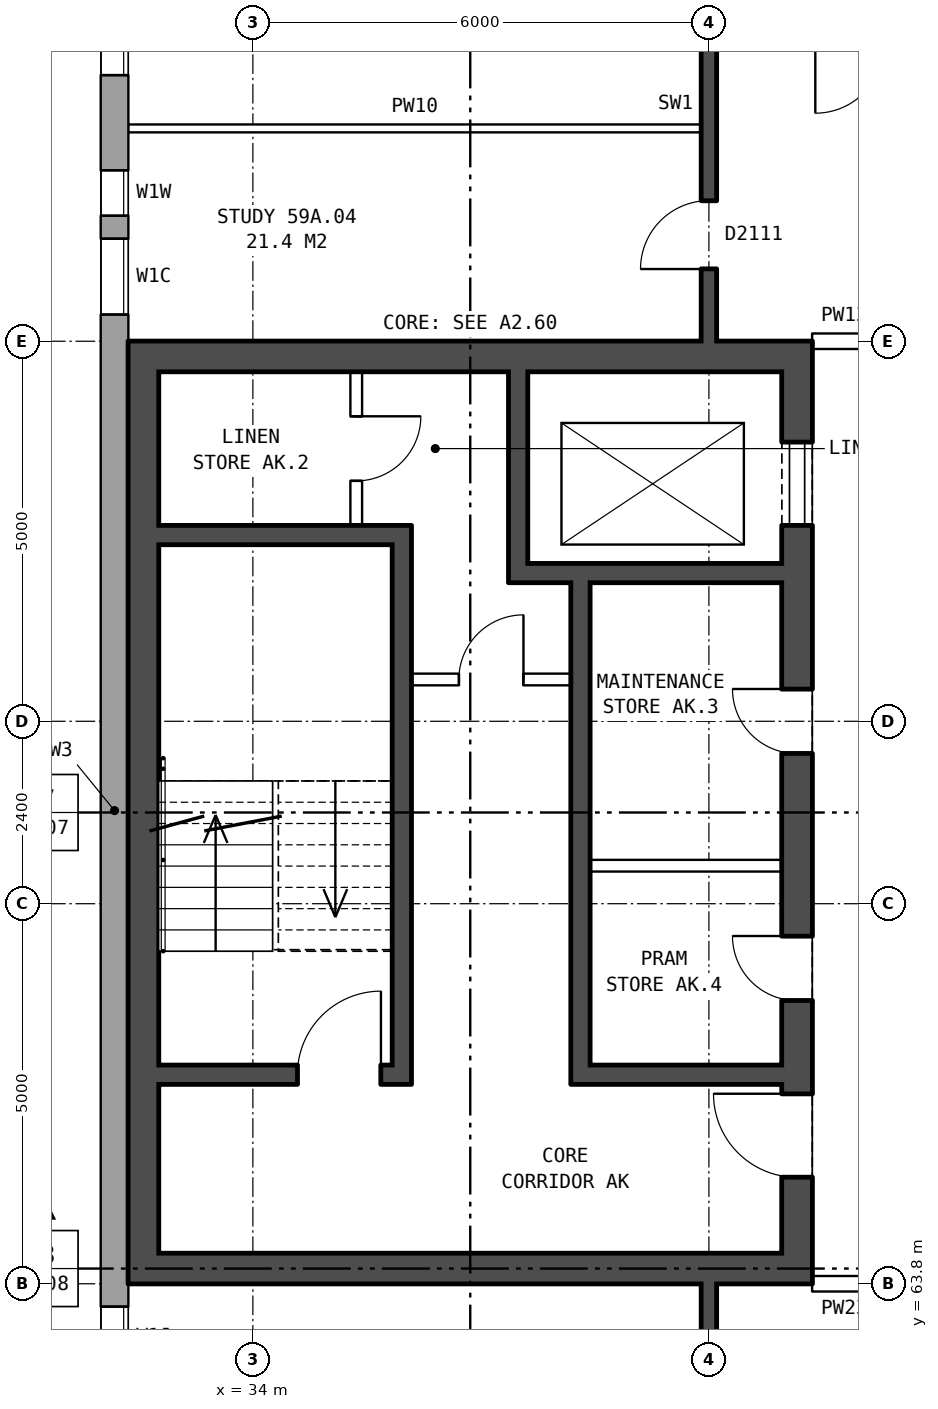
"""IFC4 building model, lengths in metres.
Left out: names, types, materials, properties, quantities, classifications, styles, units other than length and angle.
Written with IfcOpenShell. Run it as: python <this file> out.ifc"""

import sys

from ifc_helpers import new_model, si_unit, direction, frame, frame_2d, origin, place, context, subcontext, project, spatial, rectangle, extrude, element, fill, save


model = new_model("IFC4")
c1 = context("Model", 3, precision=1e-05, world=origin(), true_north=direction((0.0, 1.0)))
c2 = subcontext(c1, "Body", "Model", "MODEL_VIEW")
j1 = project(units=[si_unit("LENGTHUNIT", "METRE"), si_unit("PLANEANGLEUNIT", "RADIAN")], contexts=[c1])
p1 = place(None, origin())
s1 = spatial("IfcSite", under=j1, at=p1, CompositionType="ELEMENT")
p2 = place(p1, origin())
s2 = spatial("IfcBuilding", under=s1, at=p2, CompositionType="ELEMENT")
p3 = place(p2, frame((0.0, 0.0, 209.0)))
s3 = spatial("IfcBuildingStorey", under=s2, at=p3, CompositionType="ELEMENT", Elevation=209.0)
p4 = place(p3, frame((32.18, 82.925, 0.0), z_axis=(0.0, 0.0, 1.0), x_axis=(0.0, -1.0, 0.0)))
e1 = element("IfcWall", 1, at=p4, inside=s3, PredefinedType="STANDARD", context=c2, shape_type="SweptSolid", body=[
    extrude(rectangle(XDim=25.851, YDim=0.36, at=frame_2d((12.925, 0.0))), origin(), (0.0, 0.0, 1.0), 2.85),
])
p5 = place(p4, frame((1.625, 0.0, 0.8)))
e2 = element("IfcOpeningElement", 2, at=p5, cuts=e1, PredefinedType="OPENING", context=c2, shape_type="SweptSolid", body=[
    extrude(rectangle(XDim=1.6, YDim=1.8, at=frame_2d((0.8, 0.9))), frame((0.0, 0.19, 0.0), z_axis=(0.0, -1.0, 0.0), x_axis=(1.0, 0.0, 0.0)), (0.0, 0.0, 1.0), 0.38),
])
p6 = place(p4, frame((4.475, 0.0, 0.15)))
e3 = element("IfcOpeningElement", 3, at=p6, cuts=e1, PredefinedType="OPENING", context=c2, shape_type="SweptSolid", body=[
    extrude(rectangle(XDim=0.6, YDim=0.9, at=frame_2d((0.3, 0.45))), frame((0.0, 0.19, 0.0), z_axis=(0.0, -1.0, 0.0), x_axis=(1.0, 0.0, 0.0)), (0.0, 0.0, 1.0), 0.38),
])
p7 = place(p4, frame((19.425, 0.0, 0.8)))
e4 = element("IfcOpeningElement", 4, at=p7, cuts=e1, PredefinedType="OPENING", context=c2, shape_type="SweptSolid", body=[
    extrude(rectangle(XDim=0.8, YDim=1.5, at=frame_2d((0.4, 0.75))), frame((0.0, 0.19, 0.0), z_axis=(0.0, -1.0, 0.0), x_axis=(1.0, 0.0, 0.0)), (0.0, 0.0, 1.0), 0.38),
])
p8 = place(p4, frame((22.625, 0.0, 0.8)))
e5 = element("IfcOpeningElement", 5, at=p8, cuts=e1, PredefinedType="OPENING", context=c2, shape_type="SweptSolid", body=[
    extrude(rectangle(XDim=1.6, YDim=1.8, at=frame_2d((0.8, 0.9))), frame((0.0, 0.19, 0.0), z_axis=(0.0, -1.0, 0.0), x_axis=(1.0, 0.0, 0.0)), (0.0, 0.0, 1.0), 0.38),
])
p9 = place(p4, frame((5.375, 0.0, 0.15)))
e6 = element("IfcOpeningElement", 6, at=p9, cuts=e1, PredefinedType="OPENING", context=c2, shape_type="SweptSolid", body=[
    extrude(rectangle(XDim=1.0, YDim=1.8, at=frame_2d((0.5, 0.9))), frame((0.0, 0.19, 0.0), z_axis=(0.0, -1.0, 0.0), x_axis=(1.0, 0.0, 0.0)), (0.0, 0.0, 1.0), 0.38),
])
p10 = place(p4, frame((21.475, 0.0, 1.7)))
e7 = element("IfcOpeningElement", 7, at=p10, cuts=e1, PredefinedType="OPENING", context=c2, shape_type="SweptSolid", body=[
    extrude(rectangle(XDim=0.8, YDim=0.9, at=frame_2d((0.4, 0.45))), frame((0.0, 0.19, 0.0), z_axis=(0.0, -1.0, 0.0), x_axis=(1.0, 0.0, 0.0)), (0.0, 0.0, 1.0), 0.38),
])
p11 = place(p3, frame((41.16, 76.2, 0.0), z_axis=(0.0, 0.0, 1.0), x_axis=(0.0, -1.0, 0.0)))
e8 = element("IfcWall", 8, at=p11, inside=s3, PredefinedType="SHEAR", context=c2, shape_type="SweptSolid", body=[
    extrude(rectangle(XDim=12.4, YDim=0.4, at=frame_2d((6.2, 0.0))), origin(), (0.0, 0.0, 1.0), 2.85),
])
p12 = place(p11, frame((1.325, 0.0, 0.0)))
e9 = element("IfcOpeningElement", 9, at=p12, cuts=e8, PredefinedType="OPENING", context=c2, shape_type="SweptSolid", body=[
    extrude(rectangle(XDim=1.1, YDim=2.1, at=frame_2d((0.55, 1.05))), frame((0.0, 0.21, 0.0), z_axis=(0.0, -1.0, 0.0), x_axis=(1.0, 0.0, 0.0)), (0.0, 0.0, 1.0), 0.42),
])
p13 = place(p11, frame((4.575, 0.0, 0.0)))
e10 = element("IfcOpeningElement", 10, at=p13, cuts=e8, PredefinedType="OPENING", context=c2, shape_type="SweptSolid", body=[
    extrude(rectangle(XDim=0.85, YDim=2.1, at=frame_2d((0.425, 1.05))), frame((0.0, 0.21, 0.0), z_axis=(0.0, -1.0, 0.0), x_axis=(1.0, 0.0, 0.0)), (0.0, 0.0, 1.0), 0.42),
])
p14 = place(p11, frame((7.825, 0.0, 0.0)))
e11 = element("IfcOpeningElement", 11, at=p14, cuts=e8, PredefinedType="OPENING", context=c2, shape_type="SweptSolid", body=[
    extrude(rectangle(XDim=0.85, YDim=2.1, at=frame_2d((0.425, 1.05))), frame((0.0, 0.21, 0.0), z_axis=(0.0, -1.0, 0.0), x_axis=(1.0, 0.0, 0.0)), (0.0, 0.0, 1.0), 0.42),
])
p15 = place(p11, frame((9.9, 0.0, 0.0)))
e12 = element("IfcOpeningElement", 12, at=p15, cuts=e8, PredefinedType="OPENING", context=c2, shape_type="SweptSolid", body=[
    extrude(rectangle(XDim=1.1, YDim=2.1, at=frame_2d((0.55, 1.05))), frame((0.0, 0.21, 0.0), z_axis=(0.0, -1.0, 0.0), x_axis=(1.0, 0.0, 0.0)), (0.0, 0.0, 1.0), 0.42),
])
p16 = place(p3, frame((32.56, 76.2, 0.0), z_axis=(0.0, 0.0, 1.0), x_axis=(0.0, -1.0, 0.0)))
e13 = element("IfcWall", 13, at=p16, inside=s3, PredefinedType="SHEAR", context=c2, shape_type="SweptSolid", body=[
    extrude(rectangle(XDim=12.4, YDim=0.4, at=frame_2d((6.2, 0.0))), origin(), (0.0, 0.0, 1.0), 2.85),
])
for number, where, z_axis, x_axis in (
    (14, (40.96, 76.0, 0.0), (0.0, 0.0, 1.0), (-1.0, 0.0, 0.0)),
    (15, (40.96, 64.0, 0.0), (0.0, 0.0, 1.0), (-1.0, 0.0, 0.0)),
):
    element("IfcWall", number, at=place(p3, frame(where, z_axis=z_axis, x_axis=x_axis)), inside=s3, PredefinedType="SHEAR", context=c2, shape_type="SweptSolid", body=[
        extrude(rectangle(XDim=8.2, YDim=0.4, at=frame_2d((4.1, 0.0))), origin(), (0.0, 0.0, 1.0), 2.85),
    ])
p17 = place(p3, frame((35.835, 73.65, 0.0), z_axis=(0.0, 0.0, 1.0), x_axis=(-1.0, 0.0, 0.0)))
e16 = element("IfcWall", 16, at=p17, inside=s3, PredefinedType="SHEAR", context=c2, shape_type="SweptSolid", body=[
    extrude(rectangle(XDim=3.075, YDim=0.25, at=frame_2d((1.538, 0.0))), origin(), (0.0, 0.0, 1.0), 2.85),
])
p18 = place(p3, frame((40.96, 73.15, 0.0), z_axis=(0.0, 0.0, 1.0), x_axis=(-1.0, 0.0, 0.0)))
e17 = element("IfcWall", 17, at=p18, inside=s3, PredefinedType="SHEAR", context=c2, shape_type="SweptSolid", body=[
    extrude(rectangle(XDim=3.595, YDim=0.25, at=frame_2d((1.797, 0.0))), origin(), (0.0, 0.0, 1.0), 2.85),
])
p19 = place(p3, frame((38.185, 71.75, 0.0), z_axis=(0.0, 0.0, 1.0), x_axis=(-1.0, 0.0, 0.0)))
e18 = element("IfcWall", 18, at=p19, inside=s3, PredefinedType="PARTITIONING", context=c2, shape_type="SweptSolid", body=[
    extrude(rectangle(XDim=2.1, YDim=0.15, at=frame_2d((1.05, 0.0))), origin(), (0.0, 0.0, 1.0), 2.85),
])
p20 = place(p19, frame((0.625, 0.0, 0.0)))
e19 = element("IfcOpeningElement", 19, at=p20, cuts=e18, PredefinedType="OPENING", context=c2, shape_type="SweptSolid", body=[
    extrude(rectangle(XDim=0.85, YDim=2.1, at=frame_2d((0.425, 1.05))), frame((0.0, 0.085, 0.0), z_axis=(0.0, -1.0, 0.0), x_axis=(1.0, 0.0, 0.0)), (0.0, 0.0, 1.0), 0.17),
])
p21 = place(p3, frame((40.96, 69.3, 0.0), z_axis=(0.0, 0.0, 1.0), x_axis=(-1.0, 0.0, 0.0)))
e20 = element("IfcWall", 20, at=p21, inside=s3, PredefinedType="PARTITIONING", context=c2, shape_type="SweptSolid", body=[
    extrude(rectangle(XDim=2.525, YDim=0.15, at=frame_2d((1.262, 0.0))), origin(), (0.0, 0.0, 1.0), 2.85),
])
p22 = place(p3, frame((40.96, 66.55, 0.0), z_axis=(0.0, 0.0, 1.0), x_axis=(-1.0, 0.0, 0.0)))
e21 = element("IfcWall", 21, at=p22, inside=s3, PredefinedType="SHEAR", context=c2, shape_type="SweptSolid", body=[
    extrude(rectangle(XDim=2.525, YDim=0.25, at=frame_2d((1.262, 0.0))), origin(), (0.0, 0.0, 1.0), 2.85),
])
p23 = place(p3, frame((35.835, 66.55, 0.0), z_axis=(0.0, 0.0, 1.0), x_axis=(-1.0, 0.0, 0.0)))
e22 = element("IfcWall", 22, at=p23, inside=s3, PredefinedType="SHEAR", context=c2, shape_type="SweptSolid", body=[
    extrude(rectangle(XDim=3.075, YDim=0.25, at=frame_2d((1.538, 0.0))), origin(), (0.0, 0.0, 1.0), 2.85),
])
p24 = place(p23, frame((0.15, 0.0, 0.0)))
e23 = element("IfcOpeningElement", 23, at=p24, cuts=e22, PredefinedType="OPENING", context=c2, shape_type="SweptSolid", body=[
    extrude(rectangle(XDim=1.1, YDim=2.1, at=frame_2d((0.55, 1.05))), frame((0.0, 0.135, 0.0), z_axis=(0.0, -1.0, 0.0), x_axis=(1.0, 0.0, 0.0)), (0.0, 0.0, 1.0), 0.27),
])
p25 = place(p3, frame((38.31, 73.025, 0.0), z_axis=(0.0, 0.0, 1.0), x_axis=(0.0, -1.0, 0.0)))
e24 = element("IfcWall", 24, at=p25, inside=s3, PredefinedType="SHEAR", context=c2, shape_type="SweptSolid", body=[
    extrude(rectangle(XDim=6.6, YDim=0.25, at=frame_2d((3.3, 0.0))), origin(), (0.0, 0.0, 1.0), 2.85),
])
p26 = place(p3, frame((37.49, 75.8, 0.0), z_axis=(0.0, 0.0, 1.0), x_axis=(0.0, -1.0, 0.0)))
e25 = element("IfcWall", 25, at=p26, inside=s3, PredefinedType="SHEAR", context=c2, shape_type="SweptSolid", body=[
    extrude(rectangle(XDim=2.525, YDim=0.25, at=frame_2d((1.263, 0.0))), origin(), (0.0, 0.0, 1.0), 2.85),
])
p27 = place(p3, frame((35.96, 73.775, 0.0), z_axis=(0.0, 0.0, 1.0), x_axis=(0.0, -1.0, 0.0)))
e26 = element("IfcWall", 26, at=p27, inside=s3, PredefinedType="SHEAR", context=c2, shape_type="SweptSolid", body=[
    extrude(rectangle(XDim=7.35, YDim=0.25, at=frame_2d((3.675, 0.0))), origin(), (0.0, 0.0, 1.0), 2.85),
])
p28 = place(p3, frame((35.36, 75.8, 0.0), z_axis=(0.0, 0.0, 1.0), x_axis=(0.0, -1.0, 0.0)))
e27 = element("IfcWall", 27, at=p28, inside=s3, PredefinedType="PARTITIONING", context=c2, shape_type="SweptSolid", body=[
    extrude(rectangle(XDim=2.025, YDim=0.15, at=frame_2d((1.013, 0.0))), origin(), (0.0, 0.0, 1.0), 2.85),
])
p29 = place(p28, frame((0.587, 0.0, 0.0)))
e28 = element("IfcOpeningElement", 28, at=p29, cuts=e27, PredefinedType="OPENING", context=c2, shape_type="SweptSolid", body=[
    extrude(rectangle(XDim=0.85, YDim=2.1, at=frame_2d((0.425, 1.05))), frame((0.0, 0.085, 0.0), z_axis=(0.0, -1.0, 0.0), x_axis=(1.0, 0.0, 0.0)), (0.0, 0.0, 1.0), 0.17),
])
p30 = place(p3, frame((41.36, 63.8, 0.0), z_axis=(0.0, 0.0, 1.0), x_axis=(1.0, 0.0, 0.0)))
e29 = element("IfcWall", 29, at=p30, inside=s3, PredefinedType="PARTITIONING", context=c2, shape_type="SweptSolid", body=[
    extrude(rectangle(XDim=3.0, YDim=0.2, at=frame_2d((1.5, 0.0))), origin(), (0.0, 0.0, 1.0), 2.85),
])
p31 = place(p30, frame((1.0, 0.0, 0.0)))
e30 = element("IfcOpeningElement", 30, at=p31, cuts=e29, PredefinedType="OPENING", context=c2, shape_type="SweptSolid", body=[
    extrude(rectangle(XDim=1.0, YDim=2.1, at=frame_2d((0.5, 1.05))), frame((0.0, 0.11, 0.0), z_axis=(0.0, -1.0, 0.0), x_axis=(1.0, 0.0, 0.0)), (0.0, 0.0, 1.0), 0.22),
])
p32 = place(p3, frame((41.36, 76.2, 0.0), z_axis=(0.0, 0.0, 1.0), x_axis=(1.0, 0.0, 0.0)))
e31 = element("IfcWall", 31, at=p32, inside=s3, PredefinedType="PARTITIONING", context=c2, shape_type="SweptSolid", body=[
    extrude(rectangle(XDim=3.0, YDim=0.2, at=frame_2d((1.5, 0.0))), origin(), (0.0, 0.0, 1.0), 2.85),
])
p33 = place(p32, frame((1.0, 0.0, 0.0)))
e32 = element("IfcOpeningElement", 32, at=p33, cuts=e31, PredefinedType="OPENING", context=c2, shape_type="SweptSolid", body=[
    extrude(rectangle(XDim=1.0, YDim=2.1, at=frame_2d((0.5, 1.05))), frame((0.0, 0.11, 0.0), z_axis=(0.0, -1.0, 0.0), x_axis=(1.0, 0.0, 0.0)), (0.0, 0.0, 1.0), 0.22),
])
p34 = place(p3, frame((32.36, 79.0, 0.0), z_axis=(0.0, 0.0, 1.0), x_axis=(1.0, 0.0, 0.0)))
e33 = element("IfcWall", 33, at=p34, inside=s3, PredefinedType="PARTITIONING", context=c2, shape_type="SweptSolid", body=[
    extrude(rectangle(XDim=7.54, YDim=0.1, at=frame_2d((3.77, 0.0))), origin(), (0.0, 0.0, 1.0), 2.85),
])
p35 = place(p3, frame((40.0, 54.36, 0.0), z_axis=(0.0, 0.0, 1.0), x_axis=(0.0, 1.0, 0.0)))
e34 = element("IfcWall", 34, at=p35, inside=s3, PredefinedType="SOLIDWALL", context=c2, shape_type="SweptSolid", body=[
    extrude(rectangle(XDim=9.44, YDim=0.2, at=frame_2d((4.72, 0.0))), origin(), (0.0, 0.0, 1.0), 2.85),
])
p36 = place(p35, frame((7.19, 0.0, 0.0)))
e35 = element("IfcOpeningElement", 35, at=p36, cuts=e34, PredefinedType="OPENING", context=c2, shape_type="SweptSolid", body=[
    extrude(rectangle(XDim=0.9, YDim=2.1, at=frame_2d((0.45, 1.05))), frame((0.0, 0.11, 0.0), z_axis=(0.0, -1.0, 0.0), x_axis=(1.0, 0.0, 0.0)), (0.0, 0.0, 1.0), 0.22),
])
p37 = place(p3, frame((40.0, 76.2, 0.0), z_axis=(0.0, 0.0, 1.0), x_axis=(0.0, 1.0, 0.0)))
e36 = element("IfcWall", 36, at=p37, inside=s3, PredefinedType="SOLIDWALL", context=c2, shape_type="SweptSolid", body=[
    extrude(rectangle(XDim=9.44, YDim=0.2, at=frame_2d((4.72, 0.0))), origin(), (0.0, 0.0, 1.0), 2.85),
])
p38 = place(p37, frame((7.17, 0.0, 0.0)))
e37 = element("IfcOpeningElement", 37, at=p38, cuts=e36, PredefinedType="OPENING", context=c2, shape_type="SweptSolid", body=[
    extrude(rectangle(XDim=0.9, YDim=2.1, at=frame_2d((0.45, 1.05))), frame((0.0, 0.11, 0.0), z_axis=(0.0, -1.0, 0.0), x_axis=(1.0, 0.0, 0.0)), (0.0, 0.0, 1.0), 0.22),
])
p39 = place(p37, frame((4.4, 0.0, 0.0)))
e38 = element("IfcOpeningElement", 38, at=p39, cuts=e36, PredefinedType="OPENING", context=c2, shape_type="SweptSolid", body=[
    extrude(rectangle(XDim=0.9, YDim=2.1, at=frame_2d((0.45, 1.05))), frame((0.0, 0.11, 0.0), z_axis=(0.0, -1.0, 0.0), x_axis=(1.0, 0.0, 0.0)), (0.0, 0.0, 1.0), 0.22),
])
p40 = place(p37, frame((0.95, 0.0, 0.0)))
e39 = element("IfcOpeningElement", 39, at=p40, cuts=e36, PredefinedType="OPENING", context=c2, shape_type="SweptSolid", body=[
    extrude(rectangle(XDim=0.9, YDim=2.1, at=frame_2d((0.45, 1.05))), frame((0.0, 0.11, 0.0), z_axis=(0.0, -1.0, 0.0), x_axis=(1.0, 0.0, 0.0)), (0.0, 0.0, 1.0), 0.22),
])
p41 = place(p5, origin())
e40 = element("IfcWindow", 40, at=p41, inside=s3, PartitioningType="SINGLE_PANEL", PredefinedType="WINDOW", context=c2, shape_type="SweptSolid", body=[
    extrude(rectangle(XDim=1.6, YDim=1.8, at=frame_2d((0.8, 0.9))), frame((0.0, 0.15, 0.0), z_axis=(0.0, -1.0, 0.0), x_axis=(1.0, 0.0, 0.0)), (0.0, 0.0, 1.0), 0.06),
])
fill(e2, e40)
p42 = place(p6, origin())
e41 = element("IfcWindow", 41, at=p42, inside=s3, PartitioningType="SINGLE_PANEL", PredefinedType="WINDOW", context=c2, shape_type="SweptSolid", body=[
    extrude(rectangle(XDim=0.6, YDim=0.9, at=frame_2d((0.3, 0.45))), frame((0.0, 0.15, 0.0), z_axis=(0.0, -1.0, 0.0), x_axis=(1.0, 0.0, 0.0)), (0.0, 0.0, 1.0), 0.06),
])
fill(e3, e41)
p43 = place(p7, origin())
e42 = element("IfcWindow", 42, at=p43, inside=s3, PartitioningType="SINGLE_PANEL", PredefinedType="WINDOW", context=c2, shape_type="SweptSolid", body=[
    extrude(rectangle(XDim=0.8, YDim=1.5, at=frame_2d((0.4, 0.75))), frame((0.0, 0.15, 0.0), z_axis=(0.0, -1.0, 0.0), x_axis=(1.0, 0.0, 0.0)), (0.0, 0.0, 1.0), 0.06),
])
fill(e4, e42)
p44 = place(p12, origin())
e43 = element("IfcDoor", 43, at=p44, inside=s3, OperationType="DOUBLE_DOOR_SLIDING", PredefinedType="DOOR", context=c2, shape_type="SweptSolid", body=[
    extrude(rectangle(XDim=1.1, YDim=2.1, at=frame_2d((0.55, 1.05))), frame((0.0, -0.135, 0.0), z_axis=(0.0, -1.0, 0.0), x_axis=(1.0, 0.0, 0.0)), (0.0, 0.0, 1.0), 0.05),
])
fill(e9, e43)
p45 = place(p13, frame((0.85, 0.0, 0.0), z_axis=(0.0, 0.0, 1.0), x_axis=(-1.0, 0.0, 0.0)))
e44 = element("IfcDoor", 44, at=p45, inside=s3, OperationType="SINGLE_SWING_RIGHT", PredefinedType="DOOR", context=c2, shape_type="SweptSolid", body=[
    extrude(rectangle(XDim=0.85, YDim=2.1, at=frame_2d((0.425, 1.05))), frame((0.0, 0.185, 0.0), z_axis=(0.0, -1.0, 0.0), x_axis=(1.0, 0.0, 0.0)), (0.0, 0.0, 1.0), 0.05),
])
fill(e10, e44)
p46 = place(p14, frame((0.85, 0.0, 0.0), z_axis=(0.0, 0.0, 1.0), x_axis=(-1.0, 0.0, 0.0)))
e45 = element("IfcDoor", 45, at=p46, inside=s3, OperationType="SINGLE_SWING_RIGHT", PredefinedType="DOOR", context=c2, shape_type="SweptSolid", body=[
    extrude(rectangle(XDim=0.85, YDim=2.1, at=frame_2d((0.425, 1.05))), frame((0.0, 0.185, 0.0), z_axis=(0.0, -1.0, 0.0), x_axis=(1.0, 0.0, 0.0)), (0.0, 0.0, 1.0), 0.05),
])
fill(e11, e45)
p47 = place(p15, frame((1.1, 0.0, 0.0), z_axis=(0.0, 0.0, 1.0), x_axis=(-1.0, 0.0, 0.0)))
e46 = element("IfcDoor", 46, at=p47, inside=s3, OperationType="SINGLE_SWING_RIGHT", PredefinedType="DOOR", context=c2, shape_type="SweptSolid", body=[
    extrude(rectangle(XDim=1.1, YDim=2.1, at=frame_2d((0.55, 1.05))), frame((0.0, 0.185, 0.0), z_axis=(0.0, -1.0, 0.0), x_axis=(1.0, 0.0, 0.0)), (0.0, 0.0, 1.0), 0.05),
])
fill(e12, e46)
p48 = place(p24, frame((1.1, 0.0, 0.0), z_axis=(0.0, 0.0, 1.0), x_axis=(-1.0, 0.0, 0.0)))
e47 = element("IfcDoor", 47, at=p48, inside=s3, OperationType="SINGLE_SWING_RIGHT", PredefinedType="DOOR", context=c2, shape_type="SweptSolid", body=[
    extrude(rectangle(XDim=1.1, YDim=2.1, at=frame_2d((0.55, 1.05))), frame((0.0, 0.025, 0.0), z_axis=(0.0, -1.0, 0.0), x_axis=(1.0, 0.0, 0.0)), (0.0, 0.0, 1.0), 0.05),
])
fill(e23, e47)
p49 = place(p20, frame((0.85, 0.0, 0.0), z_axis=(0.0, 0.0, 1.0), x_axis=(-1.0, 0.0, 0.0)))
e48 = element("IfcDoor", 48, at=p49, inside=s3, OperationType="SINGLE_SWING_RIGHT", PredefinedType="DOOR", context=c2, shape_type="SweptSolid", body=[
    extrude(rectangle(XDim=0.85, YDim=2.1, at=frame_2d((0.425, 1.05))), frame((0.0, 0.025, 0.0), z_axis=(0.0, -1.0, 0.0), x_axis=(1.0, 0.0, 0.0)), (0.0, 0.0, 1.0), 0.05),
])
fill(e19, e48)
p50 = place(p29, origin())
e49 = element("IfcDoor", 49, at=p50, inside=s3, OperationType="SINGLE_SWING_LEFT", PredefinedType="DOOR", context=c2, shape_type="SweptSolid", body=[
    extrude(rectangle(XDim=0.85, YDim=2.1, at=frame_2d((0.425, 1.05))), frame((0.0, 0.025, 0.0), z_axis=(0.0, -1.0, 0.0), x_axis=(1.0, 0.0, 0.0)), (0.0, 0.0, 1.0), 0.05),
])
fill(e28, e49)
p51 = place(p40, origin())
e50 = element("IfcDoor", 50, at=p51, inside=s3, OperationType="SINGLE_SWING_LEFT", PredefinedType="DOOR", context=c2, shape_type="SweptSolid", body=[
    extrude(rectangle(XDim=0.9, YDim=2.1, at=frame_2d((0.45, 1.05))), frame((0.0, 0.025, 0.0), z_axis=(0.0, -1.0, 0.0), x_axis=(1.0, 0.0, 0.0)), (0.0, 0.0, 1.0), 0.05),
])
fill(e39, e50)
p52 = place(p9, origin())
e51 = element("IfcWindow", 51, at=p52, inside=s3, PartitioningType="SINGLE_PANEL", PredefinedType="WINDOW", context=c2, shape_type="SweptSolid", body=[
    extrude(rectangle(XDim=1.0, YDim=1.8, at=frame_2d((0.5, 0.9))), frame((0.0, 0.15, 0.0), z_axis=(0.0, -1.0, 0.0), x_axis=(1.0, 0.0, 0.0)), (0.0, 0.0, 1.0), 0.06),
])
fill(e6, e51)
save(model, sys.argv[1])
